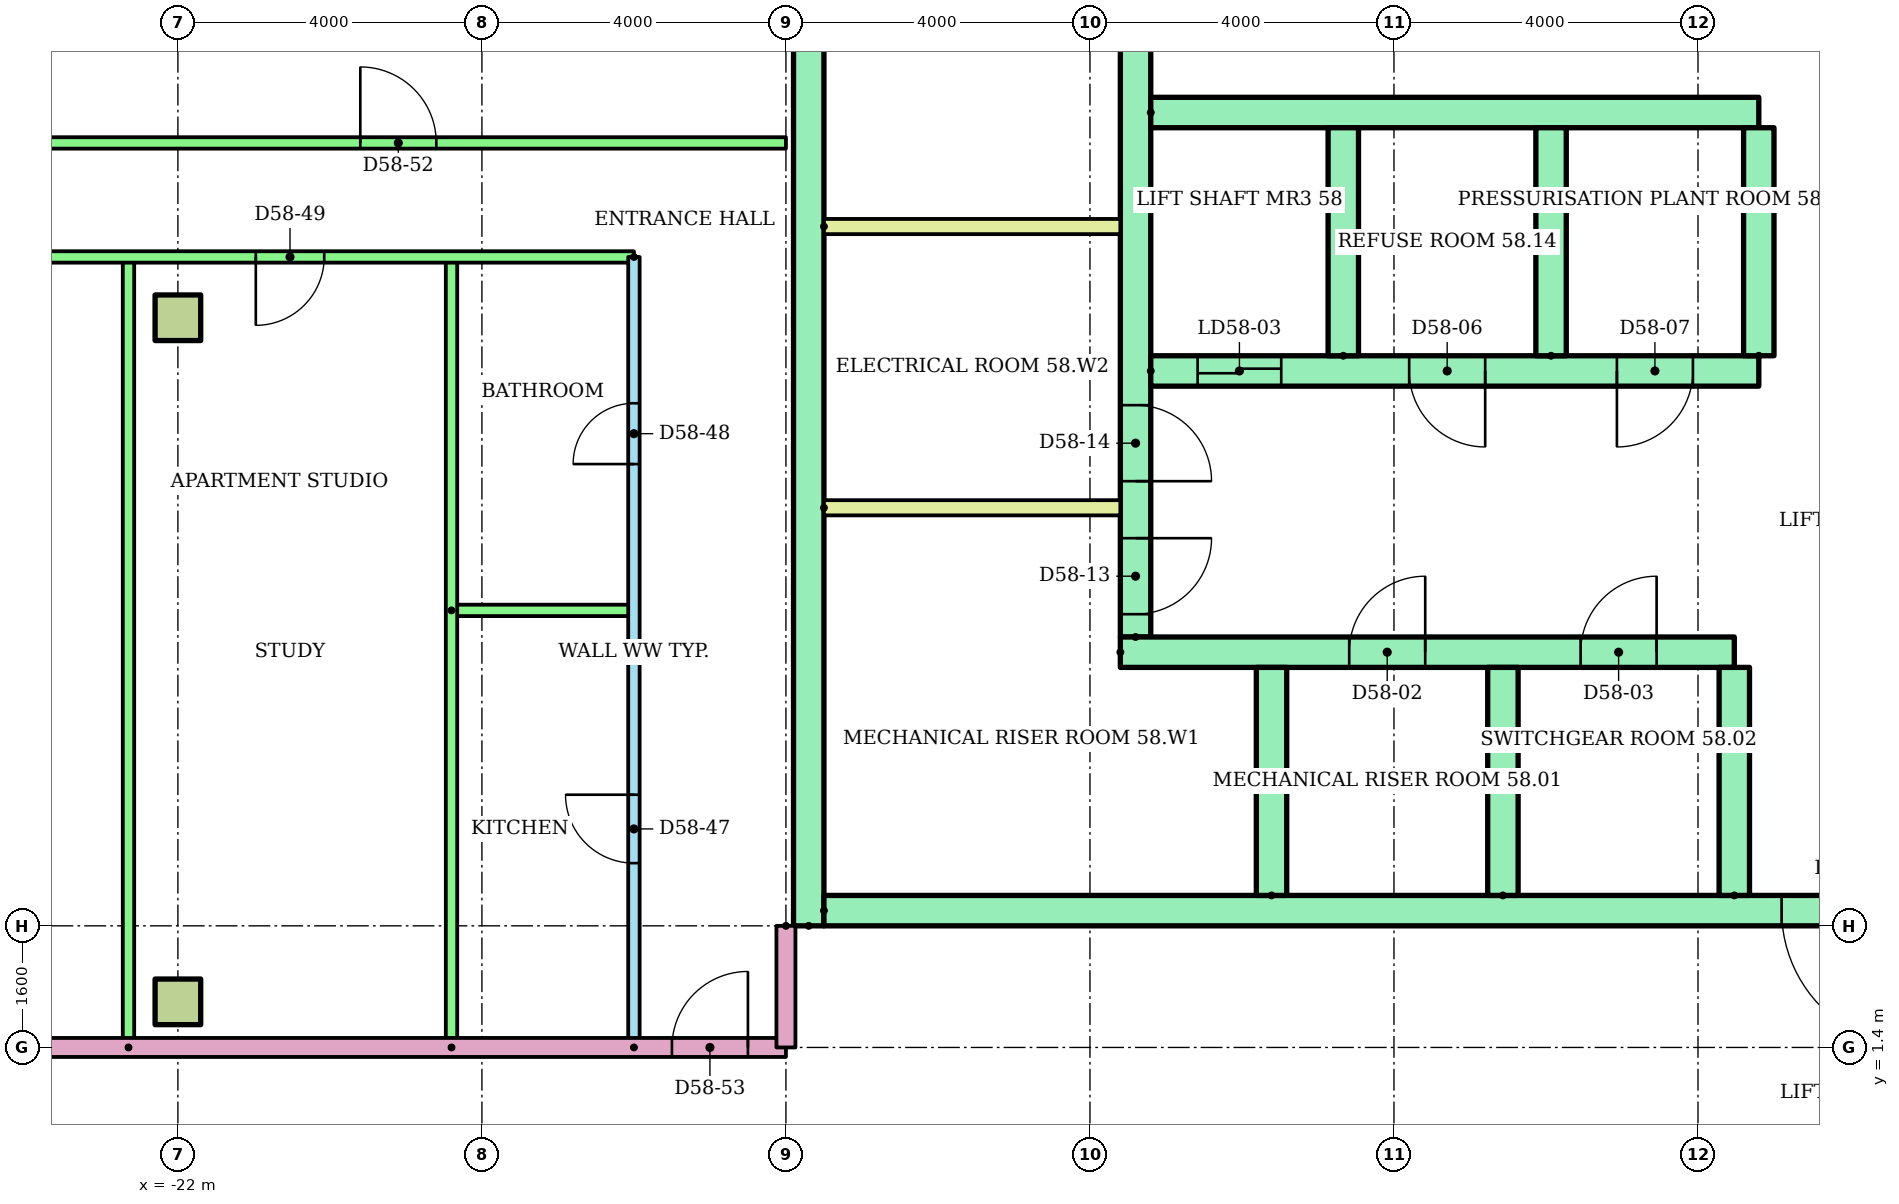
"""IFC4 building model, lengths in metres.
Left out: names, types, materials, properties, quantities, classifications, styles, units other than length and angle.
Written with IfcOpenShell. Run it as: python <this file> out.ifc"""

import sys

from ifc_helpers import new_model, si_unit, direction, frame, frame_2d, origin, origin_2d, place, context, subcontext, project, spatial, rectangle, extrude, element, fill, save


model = new_model("IFC4")
c1 = context("Model", 3, precision=1e-05, world=origin(), true_north=direction((0.0, 1.0)))
c2 = subcontext(c1, "Body", "Model", "MODEL_VIEW")
j1 = project(units=[si_unit("LENGTHUNIT", "METRE"), si_unit("PLANEANGLEUNIT", "RADIAN")], contexts=[c1])
p1 = place(None, origin())
s1 = spatial("IfcSite", under=j1, at=p1, CompositionType="ELEMENT")
p2 = place(p1, origin())
s2 = spatial("IfcBuilding", under=s1, at=p2, CompositionType="ELEMENT")
p3 = place(p2, frame((0.0, 0.0, 223.6)))
s3 = spatial("IfcBuildingStorey", under=s2, at=p3, CompositionType="ELEMENT", Elevation=223.6)
for number, where in (
    (1, (-22.0, 2.0, 0.0)),
    (2, (-22.0, 11.0, 0.0)),
):
    element("IfcColumn", number, at=place(p3, frame(where)), inside=s3, PredefinedType="COLUMN", context=c2, shape_type="SweptSolid", body=[
        extrude(rectangle(XDim=0.6, YDim=0.6, at=origin_2d()), origin(), (0.0, 0.0, 1.0), 3.2),
    ])
p4 = place(p3, frame((-13.7, 3.0, 0.0), z_axis=(0.0, 0.0, 1.0), x_axis=(0.0, 1.0, 0.0)))
e3 = element("IfcWall", 3, at=p4, inside=s3, PredefinedType="SHEAR", context=c2, shape_type="SweptSolid", body=[
    extrude(rectangle(XDim=17.0, YDim=0.4, at=frame_2d((8.5, 0.0))), origin(), (0.0, 0.0, 1.0), 2.92),
])
p5 = place(p3, frame((-9.4, 6.8, 0.0), z_axis=(0.0, 0.0, 1.0), x_axis=(0.0, 1.0, 0.0)))
e4 = element("IfcWall", 4, at=p5, inside=s3, PredefinedType="SHEAR", context=c2, shape_type="SweptSolid", body=[
    extrude(rectangle(XDim=12.7, YDim=0.4, at=frame_2d((6.35, 0.0))), origin(), (0.0, 0.0, 1.0), 2.92),
])
p6 = place(p5, frame((0.3, 0.0, 0.0)))
e5 = element("IfcOpeningElement", 5, at=p6, cuts=e4, PredefinedType="OPENING", context=c2, shape_type="SweptSolid", body=[
    extrude(rectangle(XDim=1.0, YDim=2.1, at=frame_2d((0.5, 1.05))), frame((0.0, 0.21, 0.0), z_axis=(0.0, -1.0, 0.0), x_axis=(1.0, 0.0, 0.0)), (0.0, 0.0, 1.0), 0.42),
])
p7 = place(p5, frame((2.05, 0.0, 0.0)))
e6 = element("IfcOpeningElement", 6, at=p7, cuts=e4, PredefinedType="OPENING", context=c2, shape_type="SweptSolid", body=[
    extrude(rectangle(XDim=1.0, YDim=2.1, at=frame_2d((0.5, 1.05))), frame((0.0, 0.21, 0.0), z_axis=(0.0, -1.0, 0.0), x_axis=(1.0, 0.0, 0.0)), (0.0, 0.0, 1.0), 0.42),
])
p8 = place(p5, frame((7.925, 0.0, 0.0)))
e7 = element("IfcOpeningElement", 7, at=p8, cuts=e4, PredefinedType="OPENING", context=c2, shape_type="SweptSolid", body=[
    extrude(rectangle(XDim=1.0, YDim=2.1, at=frame_2d((0.5, 1.05))), frame((0.0, 0.21, 0.0), z_axis=(0.0, -1.0, 0.0), x_axis=(1.0, 0.0, 0.0)), (0.0, 0.0, 1.0), 0.42),
])
p9 = place(p3, frame((-13.5, 3.2, 0.0)))
e8 = element("IfcWall", 8, at=p9, inside=s3, PredefinedType="SHEAR", context=c2, shape_type="SweptSolid", body=[
    extrude(rectangle(XDim=27.0, YDim=0.4, at=frame_2d((13.5, 0.0))), origin(), (0.0, 0.0, 1.0), 2.92),
])
p10 = place(p9, frame((22.083, 0.0, 0.0)))
e9 = element("IfcOpeningElement", 9, at=p10, cuts=e8, PredefinedType="OPENING", context=c2, shape_type="SweptSolid", body=[
    extrude(rectangle(XDim=1.1, YDim=2.1, at=frame_2d((0.55, 1.05))), frame((0.0, 0.21, 0.0), z_axis=(0.0, -1.0, 0.0), x_axis=(1.0, 0.0, 0.0)), (0.0, 0.0, 1.0), 0.42),
])
p11 = place(p9, frame((25.128, 0.0, 0.0)))
e10 = element("IfcOpeningElement", 10, at=p11, cuts=e8, PredefinedType="OPENING", context=c2, shape_type="SweptSolid", body=[
    extrude(rectangle(XDim=1.1, YDim=2.1, at=frame_2d((0.55, 1.05))), frame((0.0, 0.21, 0.0), z_axis=(0.0, -1.0, 0.0), x_axis=(1.0, 0.0, 0.0)), (0.0, 0.0, 1.0), 0.42),
])
p12 = place(p9, frame((12.6, 0.0, 0.0)))
e11 = element("IfcOpeningElement", 11, at=p12, cuts=e8, PredefinedType="OPENING", context=c2, shape_type="SweptSolid", body=[
    extrude(rectangle(XDim=1.8, YDim=2.1, at=frame_2d((0.9, 1.05))), frame((0.0, 0.21, 0.0), z_axis=(0.0, -1.0, 0.0), x_axis=(1.0, 0.0, 0.0)), (0.0, 0.0, 1.0), 0.42),
])
p13 = place(p3, frame((-9.6, 6.6, 0.0)))
e12 = element("IfcWall", 12, at=p13, inside=s3, PredefinedType="SHEAR", context=c2, shape_type="SweptSolid", body=[
    extrude(rectangle(XDim=8.078, YDim=0.4, at=frame_2d((4.039, 0.0))), origin(), (0.0, 0.0, 1.0), 2.92),
])
p14 = place(p13, frame((3.011, 0.0, 0.0)))
e13 = element("IfcOpeningElement", 13, at=p14, cuts=e12, PredefinedType="OPENING", context=c2, shape_type="SweptSolid", body=[
    extrude(rectangle(XDim=1.0, YDim=2.1, at=frame_2d((0.5, 1.05))), frame((0.0, 0.21, 0.0), z_axis=(0.0, -1.0, 0.0), x_axis=(1.0, 0.0, 0.0)), (0.0, 0.0, 1.0), 0.42),
])
p15 = place(p13, frame((6.056, 0.0, 0.0)))
e14 = element("IfcOpeningElement", 14, at=p15, cuts=e12, PredefinedType="OPENING", context=c2, shape_type="SweptSolid", body=[
    extrude(rectangle(XDim=1.0, YDim=2.1, at=frame_2d((0.5, 1.05))), frame((0.0, 0.21, 0.0), z_axis=(0.0, -1.0, 0.0), x_axis=(1.0, 0.0, 0.0)), (0.0, 0.0, 1.0), 0.42),
])
for number, where, z_axis, x_axis in (
    (15, (-7.611, 3.4, 0.0), (0.0, 0.0, 1.0), (0.0, 1.0, 0.0)),
    (16, (-4.567, 3.4, 0.0), (0.0, 0.0, 1.0), (0.0, 1.0, 0.0)),
    (17, (-1.522, 3.4, 0.0), (0.0, 0.0, 1.0), (0.0, 1.0, 0.0)),
):
    element("IfcWall", number, at=place(p3, frame(where, z_axis=z_axis, x_axis=x_axis)), inside=s3, PredefinedType="SHEAR", context=c2, shape_type="SweptSolid", body=[
        extrude(rectangle(XDim=3.0, YDim=0.4, at=frame_2d((1.5, 0.0))), origin(), (0.0, 0.0, 1.0), 2.92),
    ])
p16 = place(p3, frame((-9.2, 10.3, 0.0)))
e18 = element("IfcWall", 18, at=p16, inside=s3, PredefinedType="SHEAR", context=c2, shape_type="SweptSolid", body=[
    extrude(rectangle(XDim=8.0, YDim=0.4, at=frame_2d((4.0, 0.0))), origin(), (0.0, 0.0, 1.0), 2.92),
])
p17 = place(p16, frame((0.617, 0.0, 0.0)))
e19 = element("IfcOpeningElement", 19, at=p17, cuts=e18, PredefinedType="OPENING", context=c2, shape_type="SweptSolid", body=[
    extrude(rectangle(XDim=1.1, YDim=2.1, at=frame_2d((0.55, 1.05))), frame((0.0, 0.21, 0.0), z_axis=(0.0, -1.0, 0.0), x_axis=(1.0, 0.0, 0.0)), (0.0, 0.0, 1.0), 0.42),
])
p18 = place(p16, frame((3.4, 0.0, 0.0)))
e20 = element("IfcOpeningElement", 20, at=p18, cuts=e18, PredefinedType="OPENING", context=c2, shape_type="SweptSolid", body=[
    extrude(rectangle(XDim=1.0, YDim=2.1, at=frame_2d((0.5, 1.05))), frame((0.0, 0.21, 0.0), z_axis=(0.0, -1.0, 0.0), x_axis=(1.0, 0.0, 0.0)), (0.0, 0.0, 1.0), 0.42),
])
p19 = place(p16, frame((6.133, 0.0, 0.0)))
e21 = element("IfcOpeningElement", 21, at=p19, cuts=e18, PredefinedType="OPENING", context=c2, shape_type="SweptSolid", body=[
    extrude(rectangle(XDim=1.0, YDim=2.1, at=frame_2d((0.5, 1.05))), frame((0.0, 0.21, 0.0), z_axis=(0.0, -1.0, 0.0), x_axis=(1.0, 0.0, 0.0)), (0.0, 0.0, 1.0), 0.42),
])
p20 = place(p3, frame((-9.2, 13.7, 0.0)))
e22 = element("IfcWall", 22, at=p20, inside=s3, PredefinedType="SHEAR", context=c2, shape_type="SweptSolid", body=[
    extrude(rectangle(XDim=8.0, YDim=0.4, at=frame_2d((4.0, 0.0))), origin(), (0.0, 0.0, 1.0), 2.92),
])
for number, where, z_axis, x_axis in (
    (23, (-6.667, 10.5, 0.0), (0.0, 0.0, 1.0), (0.0, 1.0, 0.0)),
    (24, (-3.933, 10.5, 0.0), (0.0, 0.0, 1.0), (0.0, 1.0, 0.0)),
    (25, (-1.2, 10.5, 0.0), (0.0, 0.0, 1.0), (0.0, 1.0, 0.0)),
):
    element("IfcWall", number, at=place(p3, frame(where, z_axis=z_axis, x_axis=x_axis)), inside=s3, PredefinedType="SHEAR", context=c2, shape_type="SweptSolid", body=[
        extrude(rectangle(XDim=3.0, YDim=0.4, at=frame_2d((1.5, 0.0))), origin(), (0.0, 0.0, 1.0), 2.92),
    ])
for number, where in (
    (26, (-13.5, 8.5, 0.0)),
    (27, (-13.5, 12.2, 0.0)),
):
    element("IfcWall", number, at=place(p3, frame(where)), inside=s3, PredefinedType="PARTITIONING", context=c2, shape_type="SweptSolid", body=[
        extrude(rectangle(XDim=3.9, YDim=0.2, at=frame_2d((1.95, 0.0))), origin(), (0.0, 0.0, 1.0), 2.92),
    ])
p21 = place(p3, frame((-16.0, 1.4, 0.0), z_axis=(0.0, 0.0, 1.0), x_axis=(0.0, 1.0, 0.0)))
e28 = element("IfcWall", 28, at=p21, inside=s3, PredefinedType="PARTITIONING", context=c2, shape_type="SweptSolid", body=[
    extrude(rectangle(XDim=10.4, YDim=0.15, at=frame_2d((5.2, 0.0))), origin(), (0.0, 0.0, 1.0), 2.4),
])
p22 = place(p21, frame((2.425, 0.0, 0.0)))
e29 = element("IfcOpeningElement", 29, at=p22, cuts=e28, PredefinedType="OPENING", context=c2, shape_type="SweptSolid", body=[
    extrude(rectangle(XDim=0.9, YDim=2.1, at=frame_2d((0.45, 1.05))), frame((0.0, 0.085, 0.0), z_axis=(0.0, -1.0, 0.0), x_axis=(1.0, 0.0, 0.0)), (0.0, 0.0, 1.0), 0.17),
])
p23 = place(p21, frame((7.675, 0.0, 0.0)))
e30 = element("IfcOpeningElement", 30, at=p23, cuts=e28, PredefinedType="OPENING", context=c2, shape_type="SweptSolid", body=[
    extrude(rectangle(XDim=0.8, YDim=2.1, at=frame_2d((0.4, 1.05))), frame((0.0, 0.085, 0.0), z_axis=(0.0, -1.0, 0.0), x_axis=(1.0, 0.0, 0.0)), (0.0, 0.0, 1.0), 0.17),
])
p24 = place(p3, frame((-18.4, 7.15, 0.0)))
e31 = element("IfcWall", 31, at=p24, inside=s3, PredefinedType="PARTITIONING", context=c2, shape_type="SweptSolid", body=[
    extrude(rectangle(XDim=2.4, YDim=0.15, at=frame_2d((1.2, 0.0))), origin(), (0.0, 0.0, 1.0), 2.4),
])
for number, where, z_axis, x_axis in (
    (32, (-18.4, 1.4, 0.0), (0.0, 0.0, 1.0), (0.0, 1.0, 0.0)),
    (33, (-22.65, 1.4, 0.0), (0.0, 0.0, 1.0), (0.0, 1.0, 0.0)),
):
    element("IfcWall", number, at=place(p3, frame(where, z_axis=z_axis, x_axis=x_axis)), inside=s3, PredefinedType="PARTITIONING", context=c2, shape_type="SweptSolid", body=[
        extrude(rectangle(XDim=10.4, YDim=0.15, at=frame_2d((5.2, 0.0))), origin(), (0.0, 0.0, 1.0), 2.4),
    ])
p25 = place(p3, frame((-16.0, 11.8, 0.0), z_axis=(0.0, 0.0, 1.0), x_axis=(-1.0, 0.0, 0.0)))
e34 = element("IfcWall", 34, at=p25, inside=s3, PredefinedType="PARTITIONING", context=c2, shape_type="SweptSolid", body=[
    extrude(rectangle(XDim=12.92, YDim=0.15, at=frame_2d((6.46, 0.0))), origin(), (0.0, 0.0, 1.0), 2.4),
])
p26 = place(p25, frame((4.075, 0.0, 0.0)))
e35 = element("IfcOpeningElement", 35, at=p26, cuts=e34, PredefinedType="OPENING", context=c2, shape_type="SweptSolid", body=[
    extrude(rectangle(XDim=0.9, YDim=2.1, at=frame_2d((0.45, 1.05))), frame((0.0, 0.085, 0.0), z_axis=(0.0, -1.0, 0.0), x_axis=(1.0, 0.0, 0.0)), (0.0, 0.0, 1.0), 0.17),
])
p27 = place(p25, frame((9.225, 0.0, 0.0)))
e36 = element("IfcOpeningElement", 36, at=p27, cuts=e34, PredefinedType="OPENING", context=c2, shape_type="SweptSolid", body=[
    extrude(rectangle(XDim=0.9, YDim=2.1, at=frame_2d((0.45, 1.05))), frame((0.0, 0.085, 0.0), z_axis=(0.0, -1.0, 0.0), x_axis=(1.0, 0.0, 0.0)), (0.0, 0.0, 1.0), 0.17),
])
p28 = place(p3, frame((-28.92, 13.3, 0.0)))
e37 = element("IfcWall", 37, at=p28, inside=s3, PredefinedType="PARTITIONING", context=c2, shape_type="SweptSolid", body=[
    extrude(rectangle(XDim=14.92, YDim=0.15, at=frame_2d((7.46, 0.0))), origin(), (0.0, 0.0, 1.0), 2.4),
])
p29 = place(p28, frame((1.97, 0.0, 0.0)))
e38 = element("IfcOpeningElement", 38, at=p29, cuts=e37, PredefinedType="OPENING", context=c2, shape_type="SweptSolid", body=[
    extrude(rectangle(XDim=1.0, YDim=2.1, at=frame_2d((0.5, 1.05))), frame((0.0, 0.085, 0.0), z_axis=(0.0, -1.0, 0.0), x_axis=(1.0, 0.0, 0.0)), (0.0, 0.0, 1.0), 0.17),
])
p30 = place(p28, frame((9.32, 0.0, 0.0)))
e39 = element("IfcOpeningElement", 39, at=p30, cuts=e37, PredefinedType="OPENING", context=c2, shape_type="SweptSolid", body=[
    extrude(rectangle(XDim=1.0, YDim=2.1, at=frame_2d((0.5, 1.05))), frame((0.0, 0.085, 0.0), z_axis=(0.0, -1.0, 0.0), x_axis=(1.0, 0.0, 0.0)), (0.0, 0.0, 1.0), 0.17),
])
p31 = place(p3, frame((-28.92, 1.4, 0.0)))
e40 = element("IfcWall", 40, at=p31, inside=s3, PredefinedType="PARTITIONING", context=c2, shape_type="SweptSolid", body=[
    extrude(rectangle(XDim=14.92, YDim=0.25, at=frame_2d((7.46, 0.0))), origin(), (0.0, 0.0, 1.0), 2.4),
])
p32 = place(p31, frame((13.42, 0.0, 0.0)))
e41 = element("IfcOpeningElement", 41, at=p32, cuts=e40, PredefinedType="OPENING", context=c2, shape_type="SweptSolid", body=[
    extrude(rectangle(XDim=1.0, YDim=2.1, at=frame_2d((0.5, 1.05))), frame((0.0, 0.135, 0.0), z_axis=(0.0, -1.0, 0.0), x_axis=(1.0, 0.0, 0.0)), (0.0, 0.0, 1.0), 0.27),
])
p33 = place(p3, frame((-14.0, 3.0, 0.0), z_axis=(0.0, 0.0, 1.0), x_axis=(0.0, -1.0, 0.0)))
e42 = element("IfcWall", 42, at=p33, inside=s3, PredefinedType="PARTITIONING", context=c2, shape_type="SweptSolid", body=[
    extrude(rectangle(XDim=1.6, YDim=0.25, at=frame_2d((0.8, 0.0))), origin(), (0.0, 0.0, 1.0), 2.4),
])
p34 = place(p12, frame((1.8, 0.0, 0.0), z_axis=(0.0, 0.0, 1.0), x_axis=(-1.0, 0.0, 0.0)))
e43 = element("IfcDoor", 43, at=p34, inside=s3, OperationType="DOUBLE_DOOR_SINGLE_SWING", PredefinedType="DOOR", context=c2, shape_type="SweptSolid", body=[
    extrude(rectangle(XDim=1.8, YDim=2.1, at=frame_2d((0.9, 1.05))), frame((0.0, 0.025, 0.0), z_axis=(0.0, -1.0, 0.0), x_axis=(1.0, 0.0, 0.0)), (0.0, 0.0, 1.0), 0.05),
])
fill(e11, e43)
p35 = place(p14, origin())
e44 = element("IfcDoor", 44, at=p35, inside=s3, OperationType="SINGLE_SWING_RIGHT", PredefinedType="DOOR", context=c2, shape_type="SweptSolid", body=[
    extrude(rectangle(XDim=1.0, YDim=2.1, at=frame_2d((0.5, 1.05))), frame((0.0, 0.025, 0.0), z_axis=(0.0, -1.0, 0.0), x_axis=(1.0, 0.0, 0.0)), (0.0, 0.0, 1.0), 0.05),
])
fill(e13, e44)
p36 = place(p15, origin())
e45 = element("IfcDoor", 45, at=p36, inside=s3, OperationType="SINGLE_SWING_RIGHT", PredefinedType="DOOR", context=c2, shape_type="SweptSolid", body=[
    extrude(rectangle(XDim=1.0, YDim=2.1, at=frame_2d((0.5, 1.05))), frame((0.0, 0.025, 0.0), z_axis=(0.0, -1.0, 0.0), x_axis=(1.0, 0.0, 0.0)), (0.0, 0.0, 1.0), 0.05),
])
fill(e14, e45)
p37 = place(p17, origin())
e46 = element("IfcDoor", 46, at=p37, inside=s3, OperationType="SLIDING_TO_LEFT", PredefinedType="DOOR", context=c2, shape_type="SweptSolid", body=[
    extrude(rectangle(XDim=1.1, YDim=2.1, at=frame_2d((0.55, 1.05))), frame((0.0, 0.025, 0.0), z_axis=(0.0, -1.0, 0.0), x_axis=(1.0, 0.0, 0.0)), (0.0, 0.0, 1.0), 0.05),
])
fill(e19, e46)
p38 = place(p18, frame((1.0, 0.0, 0.0), z_axis=(0.0, 0.0, 1.0), x_axis=(-1.0, 0.0, 0.0)))
e47 = element("IfcDoor", 47, at=p38, inside=s3, OperationType="SINGLE_SWING_RIGHT", PredefinedType="DOOR", context=c2, shape_type="SweptSolid", body=[
    extrude(rectangle(XDim=1.0, YDim=2.1, at=frame_2d((0.5, 1.05))), frame((0.0, 0.025, 0.0), z_axis=(0.0, -1.0, 0.0), x_axis=(1.0, 0.0, 0.0)), (0.0, 0.0, 1.0), 0.05),
])
fill(e20, e47)
p39 = place(p19, frame((1.0, 0.0, 0.0), z_axis=(0.0, 0.0, 1.0), x_axis=(-1.0, 0.0, 0.0)))
e48 = element("IfcDoor", 48, at=p39, inside=s3, OperationType="SINGLE_SWING_LEFT", PredefinedType="DOOR", context=c2, shape_type="SweptSolid", body=[
    extrude(rectangle(XDim=1.0, YDim=2.1, at=frame_2d((0.5, 1.05))), frame((0.0, 0.025, 0.0), z_axis=(0.0, -1.0, 0.0), x_axis=(1.0, 0.0, 0.0)), (0.0, 0.0, 1.0), 0.05),
])
fill(e21, e48)
p40 = place(p6, frame((1.0, 0.0, 0.0), z_axis=(0.0, 0.0, 1.0), x_axis=(-1.0, 0.0, 0.0)))
e49 = element("IfcDoor", 49, at=p40, inside=s3, OperationType="SINGLE_SWING_RIGHT", PredefinedType="DOOR", context=c2, shape_type="SweptSolid", body=[
    extrude(rectangle(XDim=1.0, YDim=2.1, at=frame_2d((0.5, 1.05))), frame((0.0, 0.025, 0.0), z_axis=(0.0, -1.0, 0.0), x_axis=(1.0, 0.0, 0.0)), (0.0, 0.0, 1.0), 0.05),
])
fill(e5, e49)
p41 = place(p7, frame((1.0, 0.0, 0.0), z_axis=(0.0, 0.0, 1.0), x_axis=(-1.0, 0.0, 0.0)))
e50 = element("IfcDoor", 50, at=p41, inside=s3, OperationType="SINGLE_SWING_LEFT", PredefinedType="DOOR", context=c2, shape_type="SweptSolid", body=[
    extrude(rectangle(XDim=1.0, YDim=2.1, at=frame_2d((0.5, 1.05))), frame((0.0, 0.025, 0.0), z_axis=(0.0, -1.0, 0.0), x_axis=(1.0, 0.0, 0.0)), (0.0, 0.0, 1.0), 0.05),
])
fill(e6, e50)
p42 = place(p22, origin())
e51 = element("IfcDoor", 51, at=p42, inside=s3, OperationType="SINGLE_SWING_RIGHT", PredefinedType="DOOR", context=c2, shape_type="SweptSolid", body=[
    extrude(rectangle(XDim=0.9, YDim=2.1, at=frame_2d((0.45, 1.05))), frame((0.0, 0.025, 0.0), z_axis=(0.0, -1.0, 0.0), x_axis=(1.0, 0.0, 0.0)), (0.0, 0.0, 1.0), 0.05),
])
fill(e29, e51)
p43 = place(p23, origin())
e52 = element("IfcDoor", 52, at=p43, inside=s3, OperationType="SINGLE_SWING_LEFT", PredefinedType="DOOR", context=c2, shape_type="SweptSolid", body=[
    extrude(rectangle(XDim=0.8, YDim=2.1, at=frame_2d((0.4, 1.05))), frame((0.0, 0.025, 0.0), z_axis=(0.0, -1.0, 0.0), x_axis=(1.0, 0.0, 0.0)), (0.0, 0.0, 1.0), 0.05),
])
fill(e30, e52)
p44 = place(p26, origin())
e53 = element("IfcDoor", 53, at=p44, inside=s3, OperationType="SINGLE_SWING_RIGHT", PredefinedType="DOOR", context=c2, shape_type="SweptSolid", body=[
    extrude(rectangle(XDim=0.9, YDim=2.1, at=frame_2d((0.45, 1.05))), frame((0.0, 0.025, 0.0), z_axis=(0.0, -1.0, 0.0), x_axis=(1.0, 0.0, 0.0)), (0.0, 0.0, 1.0), 0.05),
])
fill(e35, e53)
p45 = place(p30, origin())
e54 = element("IfcDoor", 54, at=p45, inside=s3, OperationType="SINGLE_SWING_LEFT", PredefinedType="DOOR", context=c2, shape_type="SweptSolid", body=[
    extrude(rectangle(XDim=1.0, YDim=2.1, at=frame_2d((0.5, 1.05))), frame((0.0, 0.025, 0.0), z_axis=(0.0, -1.0, 0.0), x_axis=(1.0, 0.0, 0.0)), (0.0, 0.0, 1.0), 0.05),
])
fill(e39, e54)
p46 = place(p32, origin())
e55 = element("IfcDoor", 55, at=p46, inside=s3, OperationType="SINGLE_SWING_RIGHT", PredefinedType="DOOR", context=c2, shape_type="SweptSolid", body=[
    extrude(rectangle(XDim=1.0, YDim=2.1, at=frame_2d((0.5, 1.05))), frame((0.0, 0.025, 0.0), z_axis=(0.0, -1.0, 0.0), x_axis=(1.0, 0.0, 0.0)), (0.0, 0.0, 1.0), 0.05),
])
fill(e41, e55)
save(model, sys.argv[1])
